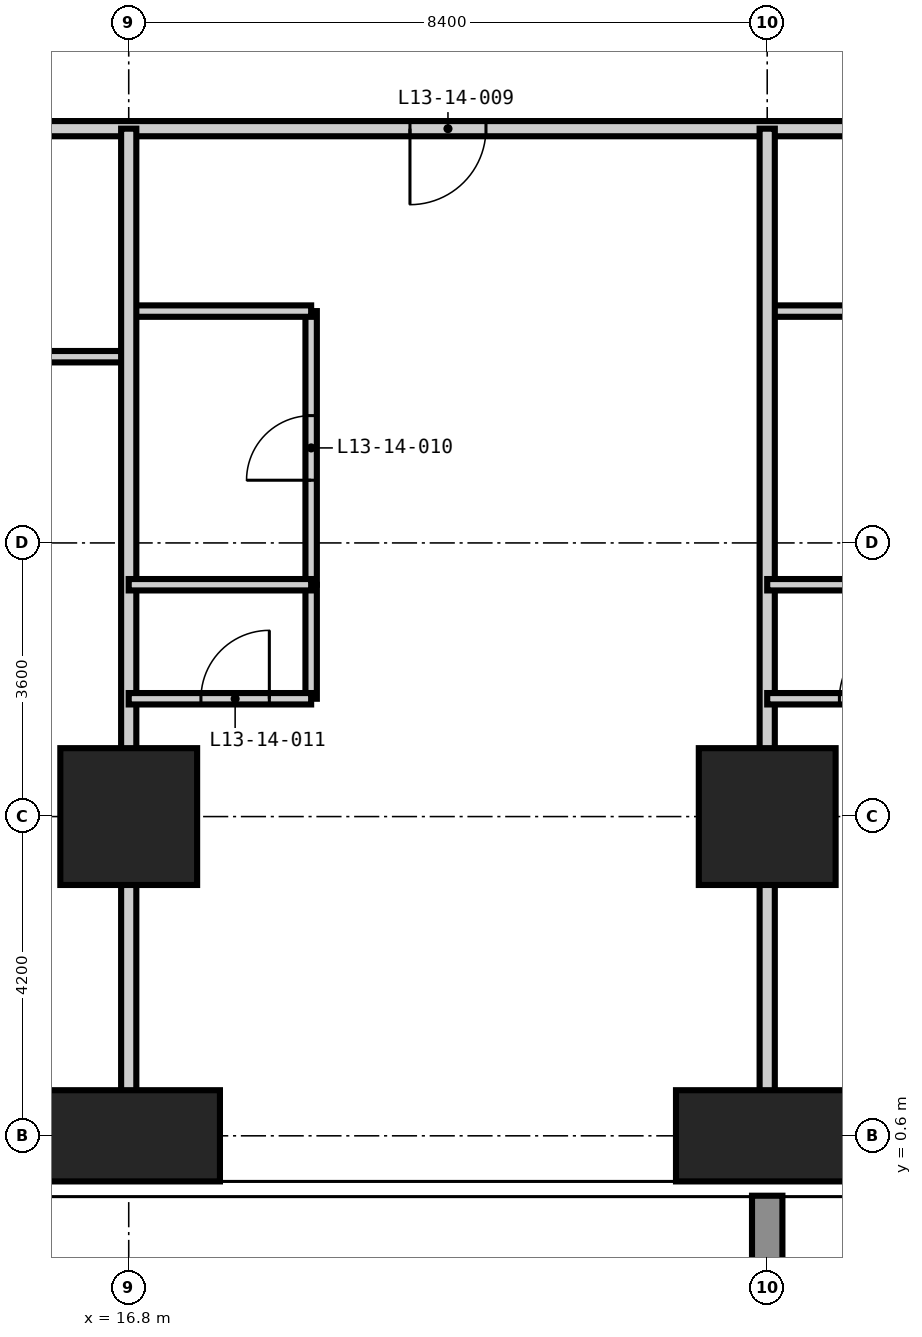
"""IFC4 building model, lengths in metres.
Left out: names, types, materials, properties, quantities, classifications, styles, units other than length and angle.
Written with IfcOpenShell. Run it as: python <this file> out.ifc"""

import sys

from ifc_helpers import new_model, si_unit, direction, frame, frame_2d, origin, origin_2d, place, context, subcontext, project, spatial, rectangle, extrude, element, fill, save


model = new_model("IFC4")
c1 = context("Model", 3, precision=1e-05, world=origin(), true_north=direction((0.0, 1.0)))
c2 = subcontext(c1, "Body", "Model", "MODEL_VIEW")
j1 = project(units=[si_unit("LENGTHUNIT", "METRE"), si_unit("PLANEANGLEUNIT", "RADIAN")], contexts=[c1])
p1 = place(None, origin())
s1 = spatial("IfcSite", under=j1, at=p1, CompositionType="ELEMENT")
p2 = place(p1, origin())
s2 = spatial("IfcBuilding", under=s1, at=p2, CompositionType="ELEMENT")
p3 = place(p2, frame((0.0, 0.0, 55.8)))
s3 = spatial("IfcBuildingStorey", under=s2, at=p3, CompositionType="ELEMENT", Elevation=55.8)
p4 = place(p3, frame((16.8, 0.6, -0.35), z_axis=(0.0, 0.0, 1.0), x_axis=(1.0, 0.0, 0.0)))
e1 = element("IfcColumn", 1, at=p4, inside=s3, PredefinedType="COLUMN", context=c2, shape_type="SweptSolid", body=[
    extrude(rectangle(XDim=2.4, YDim=1.2, at=origin_2d()), origin(), (0.0, 0.0, 1.0), 3.6),
])
p5 = place(p3, frame((16.8, 4.8, -0.35), z_axis=(0.0, 0.0, 1.0), x_axis=(1.0, 0.0, 0.0)))
e2 = element("IfcColumn", 2, at=p5, inside=s3, PredefinedType="COLUMN", context=c2, shape_type="SweptSolid", body=[
    extrude(rectangle(XDim=1.8, YDim=1.8, at=origin_2d()), origin(), (0.0, 0.0, 1.0), 3.6),
])
p6 = place(p3, frame((25.2, 0.6, -0.35), z_axis=(0.0, 0.0, 1.0), x_axis=(1.0, 0.0, 0.0)))
e3 = element("IfcColumn", 3, at=p6, inside=s3, PredefinedType="COLUMN", context=c2, shape_type="SweptSolid", body=[
    extrude(rectangle(XDim=2.4, YDim=1.2, at=origin_2d()), origin(), (0.0, 0.0, 1.0), 3.6),
])
p7 = place(p3, frame((25.2, 4.8, -0.35), z_axis=(0.0, 0.0, 1.0), x_axis=(1.0, 0.0, 0.0)))
e4 = element("IfcColumn", 4, at=p7, inside=s3, PredefinedType="COLUMN", context=c2, shape_type="SweptSolid", body=[
    extrude(rectangle(XDim=1.8, YDim=1.8, at=origin_2d()), origin(), (0.0, 0.0, 1.0), 3.6),
])
p8 = place(p3, frame((19.2, 7.85, 0.0), z_axis=(0.0, 0.0, 1.0), x_axis=(0.0, 1.0, 0.0)))
e5 = element("IfcWall", 5, at=p8, inside=s3, PredefinedType="PARTITIONING", context=c2, shape_type="SweptSolid", body=[
    extrude(rectangle(XDim=3.6, YDim=0.15, at=frame_2d((1.8, 0.0))), origin(), (0.0, 0.0, 1.0), 3.25),
])
p9 = place(p8, frame((1.375, 0.0, 0.0)))
e6 = element("IfcOpeningElement", 6, at=p9, cuts=e5, PredefinedType="OPENING", context=c2, shape_type="SweptSolid", body=[
    extrude(rectangle(XDim=0.85, YDim=2.1, at=frame_2d((0.425, 1.05))), frame((0.0, 0.085, 0.0), z_axis=(0.0, -1.0, 0.0), x_axis=(1.0, 0.0, 0.0)), (0.0, 0.0, 1.0), 0.17),
])
p10 = place(p3, frame((13.85, 10.85, 0.0), z_axis=(0.0, 0.0, 1.0), x_axis=(1.0, 0.0, 0.0)))
e7 = element("IfcWall", 7, at=p10, inside=s3, PredefinedType="PARTITIONING", context=c2, shape_type="SweptSolid", body=[
    extrude(rectangle(XDim=2.95, YDim=0.15, at=frame_2d((1.475, 0.0))), origin(), (0.0, 0.0, 1.0), 3.25),
])
p11 = place(p3, frame((16.8, 11.45, 0.0), z_axis=(0.0, 0.0, 1.0), x_axis=(1.0, 0.0, 0.0)))
e8 = element("IfcWall", 8, at=p11, inside=s3, PredefinedType="PARTITIONING", context=c2, shape_type="SweptSolid", body=[
    extrude(rectangle(XDim=2.4, YDim=0.15, at=frame_2d((1.2, 0.0))), origin(), (0.0, 0.0, 1.0), 3.25),
])
p12 = place(p3, frame((25.2, 11.45, 0.0), z_axis=(0.0, 0.0, 1.0), x_axis=(1.0, 0.0, 0.0)))
e9 = element("IfcWall", 9, at=p12, inside=s3, PredefinedType="PARTITIONING", context=c2, shape_type="SweptSolid", body=[
    extrude(rectangle(XDim=2.4, YDim=0.15, at=frame_2d((1.2, 0.0))), origin(), (0.0, 0.0, 1.0), 3.25),
])
p13 = place(p3, frame((45.55, 13.85, 0.0), z_axis=(0.0, 0.0, 1.0), x_axis=(-1.0, 0.0, 0.0)))
e10 = element("IfcWall", 10, at=p13, inside=s3, PredefinedType="PARTITIONING", context=c2, shape_type="SweptSolid", body=[
    extrude(rectangle(XDim=31.7, YDim=0.2, at=frame_2d((15.85, 0.0))), origin(), (0.0, 0.0, 1.0), 3.25),
])
p14 = place(p13, frame((24.05, 0.0, 0.0)))
e11 = element("IfcOpeningElement", 11, at=p14, cuts=e10, PredefinedType="OPENING", context=c2, shape_type="SweptSolid", body=[
    extrude(rectangle(XDim=1.0, YDim=2.2, at=frame_2d((0.5, 1.1))), frame((0.0, 0.11, 0.0), z_axis=(0.0, -1.0, 0.0), x_axis=(1.0, 0.0, 0.0)), (0.0, 0.0, 1.0), 0.22),
])
p15 = place(p13, frame((15.65, 0.0, 0.0)))
e12 = element("IfcOpeningElement", 12, at=p15, cuts=e10, PredefinedType="OPENING", context=c2, shape_type="SweptSolid", body=[
    extrude(rectangle(XDim=1.0, YDim=2.2, at=frame_2d((0.5, 1.1))), frame((0.0, 0.11, 0.0), z_axis=(0.0, -1.0, 0.0), x_axis=(1.0, 0.0, 0.0)), (0.0, 0.0, 1.0), 0.22),
])
p16 = place(p13, frame((7.25, 0.0, 0.0)))
e13 = element("IfcOpeningElement", 13, at=p16, cuts=e10, PredefinedType="OPENING", context=c2, shape_type="SweptSolid", body=[
    extrude(rectangle(XDim=1.0, YDim=2.2, at=frame_2d((0.5, 1.1))), frame((0.0, 0.11, 0.0), z_axis=(0.0, -1.0, 0.0), x_axis=(1.0, 0.0, 0.0)), (0.0, 0.0, 1.0), 0.22),
])
for number, where, z_axis, x_axis in (
    (14, (16.8, -0.008, 0.0), (0.0, 0.0, 1.0), (0.0, 1.0, 0.0)),
    (15, (25.2, -0.008, 0.0), (0.0, 0.0, 1.0), (0.0, 1.0, 0.0)),
):
    element("IfcWall", number, at=place(p3, frame(where, z_axis=z_axis, x_axis=x_axis)), inside=s3, PredefinedType="PARTITIONING", context=c2, shape_type="SweptSolid", body=[
        extrude(rectangle(XDim=13.858, YDim=0.2, at=frame_2d((6.929, 0.0))), origin(), (0.0, 0.0, 1.0), 3.25),
    ])
p17 = place(p3, frame((19.2, 6.35, 0.0), z_axis=(0.0, 0.0, 1.0), x_axis=(0.0, 1.0, 0.0)))
e16 = element("IfcWall", 16, at=p17, inside=s3, PredefinedType="PARTITIONING", context=c2, shape_type="SweptSolid", body=[
    extrude(rectangle(XDim=1.5, YDim=0.15, at=frame_2d((0.75, 0.0))), origin(), (0.0, 0.0, 1.0), 3.25),
])
p18 = place(p3, frame((16.8, 6.35, 0.0), z_axis=(0.0, 0.0, 1.0), x_axis=(1.0, 0.0, 0.0)))
e17 = element("IfcWall", 17, at=p18, inside=s3, PredefinedType="PARTITIONING", context=c2, shape_type="SweptSolid", body=[
    extrude(rectangle(XDim=2.4, YDim=0.15, at=frame_2d((1.2, 0.0))), origin(), (0.0, 0.0, 1.0), 3.25),
])
p19 = place(p18, frame((0.95, 0.0, 0.0)))
e18 = element("IfcOpeningElement", 18, at=p19, cuts=e17, PredefinedType="OPENING", context=c2, shape_type="SweptSolid", body=[
    extrude(rectangle(XDim=0.9, YDim=2.1, at=frame_2d((0.45, 1.05))), frame((0.0, 0.085, 0.0), z_axis=(0.0, -1.0, 0.0), x_axis=(1.0, 0.0, 0.0)), (0.0, 0.0, 1.0), 0.17),
])
p20 = place(p3, frame((25.2, 6.35, 0.0), z_axis=(0.0, 0.0, 1.0), x_axis=(1.0, 0.0, 0.0)))
e19 = element("IfcWall", 19, at=p20, inside=s3, PredefinedType="PARTITIONING", context=c2, shape_type="SweptSolid", body=[
    extrude(rectangle(XDim=2.4, YDim=0.15, at=frame_2d((1.2, 0.0))), origin(), (0.0, 0.0, 1.0), 3.25),
])
p21 = place(p20, frame((0.95, 0.0, 0.0)))
e20 = element("IfcOpeningElement", 20, at=p21, cuts=e19, PredefinedType="OPENING", context=c2, shape_type="SweptSolid", body=[
    extrude(rectangle(XDim=0.9, YDim=2.1, at=frame_2d((0.45, 1.05))), frame((0.0, 0.085, 0.0), z_axis=(0.0, -1.0, 0.0), x_axis=(1.0, 0.0, 0.0)), (0.0, 0.0, 1.0), 0.17),
])
p22 = place(p3, frame((16.8, 7.85, 0.0), z_axis=(0.0, 0.0, 1.0), x_axis=(1.0, 0.0, 0.0)))
e21 = element("IfcWall", 21, at=p22, inside=s3, PredefinedType="PARTITIONING", context=c2, shape_type="SweptSolid", body=[
    extrude(rectangle(XDim=2.4, YDim=0.15, at=frame_2d((1.2, 0.0))), origin(), (0.0, 0.0, 1.0), 3.25),
])
p23 = place(p3, frame((25.2, 7.85, 0.0), z_axis=(0.0, 0.0, 1.0), x_axis=(1.0, 0.0, 0.0)))
e22 = element("IfcWall", 22, at=p23, inside=s3, PredefinedType="PARTITIONING", context=c2, shape_type="SweptSolid", body=[
    extrude(rectangle(XDim=2.4, YDim=0.15, at=frame_2d((1.2, 0.0))), origin(), (0.0, 0.0, 1.0), 3.25),
])
p24 = place(p14, origin())
e23 = element("IfcDoor", 23, at=p24, inside=s3, OperationType="SINGLE_SWING_RIGHT", PredefinedType="DOOR", context=c2, shape_type="SweptSolid", body=[
    extrude(rectangle(XDim=1.0, YDim=2.2, at=frame_2d((0.5, 1.1))), frame((0.0, 0.025, 0.0), z_axis=(0.0, -1.0, 0.0), x_axis=(1.0, 0.0, 0.0)), (0.0, 0.0, 1.0), 0.05),
])
fill(e11, e23)
p25 = place(p9, origin())
e24 = element("IfcDoor", 24, at=p25, inside=s3, OperationType="SINGLE_SWING_LEFT", PredefinedType="DOOR", context=c2, shape_type="SweptSolid", body=[
    extrude(rectangle(XDim=0.85, YDim=2.1, at=frame_2d((0.425, 1.05))), frame((0.0, 0.025, 0.0), z_axis=(0.0, -1.0, 0.0), x_axis=(1.0, 0.0, 0.0)), (0.0, 0.0, 1.0), 0.05),
])
fill(e6, e24)
p26 = place(p19, origin())
e25 = element("IfcDoor", 25, at=p26, inside=s3, OperationType="SINGLE_SWING_RIGHT", PredefinedType="DOOR", context=c2, shape_type="SweptSolid", body=[
    extrude(rectangle(XDim=0.9, YDim=2.1, at=frame_2d((0.45, 1.05))), frame((0.0, 0.025, 0.0), z_axis=(0.0, -1.0, 0.0), x_axis=(1.0, 0.0, 0.0)), (0.0, 0.0, 1.0), 0.05),
])
fill(e18, e25)
p27 = place(p21, origin())
e26 = element("IfcDoor", 26, at=p27, inside=s3, OperationType="SINGLE_SWING_RIGHT", PredefinedType="DOOR", context=c2, shape_type="SweptSolid", body=[
    extrude(rectangle(XDim=0.9, YDim=2.1, at=frame_2d((0.45, 1.05))), frame((0.0, 0.025, 0.0), z_axis=(0.0, -1.0, 0.0), x_axis=(1.0, 0.0, 0.0)), (0.0, 0.0, 1.0), 0.05),
])
fill(e20, e26)
save(model, sys.argv[1])
